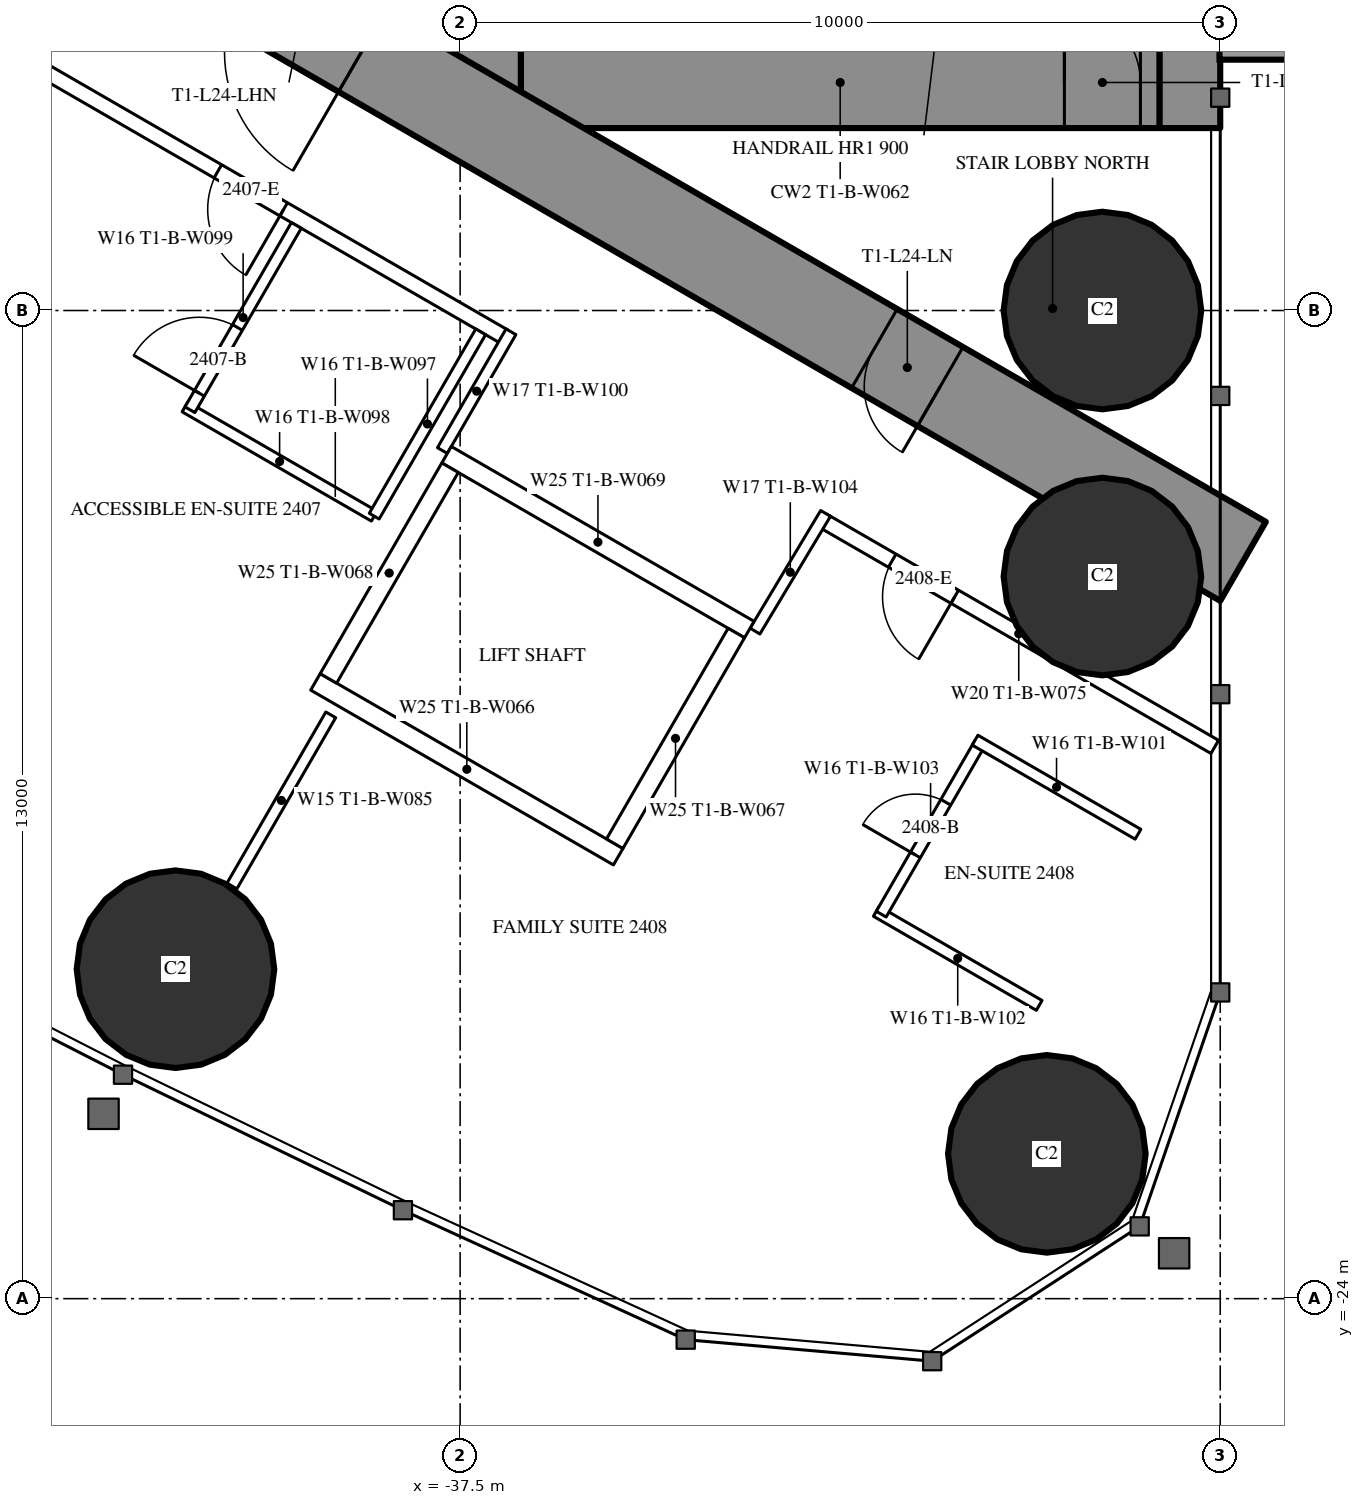
"""IFC4 building model, lengths in metres.
Left out: names, types, materials, properties, quantities, classifications, styles, units other than length and angle.
Written with IfcOpenShell. Run it as: python <this file> out.ifc"""

import sys

from ifc_helpers import new_model, si_unit, direction, frame, frame_2d, origin, origin_2d, place, context, subcontext, project, spatial, rectangle, hollow_circle, extrude, element, fill, save


model = new_model("IFC4")
c1 = context("Model", 3, precision=1e-05, world=origin(), true_north=direction((0.0, 1.0)))
c2 = subcontext(c1, "Body", "Model", "MODEL_VIEW")
j1 = project(units=[si_unit("LENGTHUNIT", "METRE"), si_unit("PLANEANGLEUNIT", "RADIAN")], contexts=[c1])
p1 = place(None, origin())
s1 = spatial("IfcSite", under=j1, at=p1, CompositionType="ELEMENT")
p2 = place(p1, origin())
s2 = spatial("IfcBuilding", under=s1, at=p2, CompositionType="ELEMENT")
p3 = place(p2, frame((0.0, 0.0, 94.1)))
s3 = spatial("IfcBuildingStorey", under=s2, at=p3, CompositionType="ELEMENT", Elevation=94.1)
for number, where, z_axis, x_axis in (
    (1, (-29.781, -22.095, 0.0), (0.0, 0.0, 1.0), (1.0, 0.0, 0.0)),
    (2, (-29.05, -11.0, 0.0), (0.0, 0.0, 1.0), (1.0, 0.0, 0.0)),
    (3, (-29.05, -14.5, 0.0), (0.0, 0.0, 1.0), (1.0, 0.0, 0.0)),
    (4, (-41.245, -19.666, 0.0), (0.0, 0.0, 1.0), (1.0, 0.0, 0.0)),
):
    element("IfcColumn", number, at=place(p3, frame(where, z_axis=z_axis, x_axis=x_axis)), inside=s3, PredefinedType="COLUMN", context=c2, shape_type="SweptSolid", body=[
        extrude(hollow_circle(Radius=1.3, WallThickness=0.1, at=origin_2d()), origin(), (0.0, 0.0, 1.0), 3.5),
    ])
p4 = place(p3, frame((-27.9, 8.6, 0.0), z_axis=(0.0, 0.0, 1.0), x_axis=(0.0, -1.0, 0.0)))
e5 = element("IfcWall", 5, at=p4, inside=s3, PredefinedType="SHEAR", context=c2, shape_type="SweptSolid", body=[
    extrude(rectangle(XDim=17.2, YDim=0.8, at=frame_2d((8.6, 0.0))), origin(), (0.0, 0.0, 1.0), 3.5),
])
p5 = place(p4, frame((2.45, 0.0, 0.6)))
e6 = element("IfcOpeningElement", 6, at=p5, cuts=e5, PredefinedType="OPENING", context=c2, shape_type="SweptSolid", body=[
    extrude(rectangle(XDim=0.6, YDim=2.1, at=frame_2d((0.3, 1.05))), frame((0.0, 0.41, 0.0), z_axis=(0.0, -1.0, 0.0), x_axis=(1.0, 0.0, 0.0)), (0.0, 0.0, 1.0), 0.82),
])
p6 = place(p4, frame((14.15, 0.0, 0.6)))
e7 = element("IfcOpeningElement", 7, at=p6, cuts=e5, PredefinedType="OPENING", context=c2, shape_type="SweptSolid", body=[
    extrude(rectangle(XDim=0.6, YDim=2.1, at=frame_2d((0.3, 1.05))), frame((0.0, 0.41, 0.0), z_axis=(0.0, -1.0, 0.0), x_axis=(1.0, 0.0, 0.0)), (0.0, 0.0, 1.0), 0.82),
])
p7 = place(p3, frame((-37.3, 8.6, 0.0), z_axis=(0.0, 0.0, 1.0), x_axis=(0.0, -1.0, 0.0)))
e8 = element("IfcWall", 8, at=p7, inside=s3, PredefinedType="SHEAR", context=c2, shape_type="SweptSolid", body=[
    extrude(rectangle(XDim=17.2, YDim=1.2, at=frame_2d((8.6, 0.0))), origin(), (0.0, 0.0, 1.0), 3.5),
])
p8 = place(p7, frame((7.7, 0.0, 0.0)))
e9 = element("IfcOpeningElement", 9, at=p8, cuts=e8, PredefinedType="OPENING", context=c2, shape_type="SweptSolid", body=[
    extrude(rectangle(XDim=1.8, YDim=2.2, at=frame_2d((0.9, 1.1))), frame((0.0, 0.61, 0.0), z_axis=(0.0, -1.0, 0.0), x_axis=(1.0, 0.0, 0.0)), (0.0, 0.0, 1.0), 1.22),
])
p9 = place(p3, frame((-28.3, -8.0, 0.0), z_axis=(0.0, 0.0, 1.0), x_axis=(-1.0, 0.0, 0.0)))
e10 = element("IfcWall", 10, at=p9, inside=s3, PredefinedType="SHEAR", context=c2, shape_type="SweptSolid", body=[
    extrude(rectangle(XDim=8.4, YDim=1.2, at=frame_2d((4.2, 0.0))), origin(), (0.0, 0.0, 1.0), 3.5),
])
p10 = place(p9, frame((0.25, 0.0, 0.0)))
e11 = element("IfcOpeningElement", 11, at=p10, cuts=e10, PredefinedType="OPENING", context=c2, shape_type="SweptSolid", body=[
    extrude(rectangle(XDim=1.0, YDim=2.2, at=frame_2d((0.5, 1.1))), frame((0.0, 0.61, 0.0), z_axis=(0.0, -1.0, 0.0), x_axis=(1.0, 0.0, 0.0)), (0.0, 0.0, 1.0), 1.22),
])
p11 = place(p3, frame((-27.2, -14.3, 0.0), z_axis=(0.0, 0.0, 1.0), x_axis=(-0.866024021859, 0.500002393557, 0.0)))
e12 = element("IfcWall", 12, at=p11, inside=s3, PredefinedType="SHEAR", context=c2, shape_type="SweptSolid", body=[
    extrude(rectangle(XDim=27.907, YDim=1.2, at=frame_2d((13.954, 0.0))), origin(), (0.0, 0.0, 1.0), 3.5),
])
p12 = place(p11, frame((4.6, 0.0, 0.0)))
e13 = element("IfcOpeningElement", 13, at=p12, cuts=e12, PredefinedType="OPENING", context=c2, shape_type="SweptSolid", body=[
    extrude(rectangle(XDim=1.0, YDim=2.2, at=frame_2d((0.5, 1.1))), frame((0.0, 0.61, 0.0), z_axis=(0.0, -1.0, 0.0), x_axis=(1.0, 0.0, 0.0)), (0.0, 0.0, 1.0), 1.22),
])
p13 = place(p11, frame((13.395, 0.0, 0.0)))
e14 = element("IfcOpeningElement", 14, at=p13, cuts=e12, PredefinedType="OPENING", context=c2, shape_type="SweptSolid", body=[
    extrude(rectangle(XDim=1.8, YDim=2.2, at=frame_2d((0.9, 1.1))), frame((0.0, 0.61, 0.0), z_axis=(0.0, -1.0, 0.0), x_axis=(1.0, 0.0, 0.0)), (0.0, 0.0, 1.0), 1.22),
])
p14 = place(p3, frame((-39.202, -16.32, 0.0), z_axis=(0.0, 0.0, 1.0), x_axis=(-0.49997716683, -0.86603858612, 0.0)))
e15 = element("IfcWall", 15, at=p14, inside=s3, PredefinedType="PARTITIONING", context=c2, shape_type="SweptSolid", body=[
    extrude(rectangle(XDim=2.6, YDim=0.15, at=frame_2d((1.3, 0.0))), origin(), (0.0, 0.0, 1.0), 3.25),
])
p15 = place(p3, frame((-27.572, -16.741, 0.0), z_axis=(0.0, 0.0, 1.0), x_axis=(-0.866024464444, 0.500001626982, 0.0)))
e16 = element("IfcWall", 16, at=p15, inside=s3, PredefinedType="PARTITIONING", context=c2, shape_type="SweptSolid", body=[
    extrude(rectangle(XDim=5.955, YDim=0.2, at=frame_2d((2.978, 0.0))), origin(), (0.0, 0.0, 1.0), 3.25),
])
p16 = place(p15, frame((3.95, 0.0, 0.0)))
e17 = element("IfcOpeningElement", 17, at=p16, cuts=e16, PredefinedType="OPENING", context=c2, shape_type="SweptSolid", body=[
    extrude(rectangle(XDim=0.95, YDim=2.2, at=frame_2d((0.475, 1.1))), frame((0.0, 0.11, 0.0), z_axis=(0.0, -1.0, 0.0), x_axis=(1.0, 0.0, 0.0)), (0.0, 0.0, 1.0), 0.22),
])
p17 = place(p3, frame((-36.92, -11.344, 0.0), z_axis=(0.0, 0.0, 1.0), x_axis=(-0.866028313256, 0.499994960614, 0.0)))
e18 = element("IfcWall", 18, at=p17, inside=s3, PredefinedType="PARTITIONING", context=c2, shape_type="SweptSolid", body=[
    extrude(rectangle(XDim=22.568, YDim=0.2, at=frame_2d((11.284, 0.0))), origin(), (0.0, 0.0, 1.0), 3.25),
])
p18 = place(p17, frame((14.481, 0.0, 0.0)))
e19 = element("IfcOpeningElement", 19, at=p18, cuts=e18, PredefinedType="OPENING", context=c2, shape_type="SweptSolid", body=[
    extrude(rectangle(XDim=0.95, YDim=2.2, at=frame_2d((0.475, 1.1))), frame((0.0, 0.11, 0.0), z_axis=(0.0, -1.0, 0.0), x_axis=(1.0, 0.0, 0.0)), (0.0, 0.0, 1.0), 0.22),
])
p19 = place(p17, frame((3.35, 0.0, 0.0)))
e20 = element("IfcOpeningElement", 20, at=p19, cuts=e18, PredefinedType="OPENING", context=c2, shape_type="SweptSolid", body=[
    extrude(rectangle(XDim=1.0, YDim=2.2, at=frame_2d((0.5, 1.1))), frame((0.0, 0.11, 0.0), z_axis=(0.0, -1.0, 0.0), x_axis=(1.0, 0.0, 0.0)), (0.0, 0.0, 1.0), 0.22),
])
p20 = place(p3, frame((-36.831, -11.28, 0.0), z_axis=(0.0, 0.0, 1.0), x_axis=(-0.499937177781, -0.866061671171, 0.0)))
e21 = element("IfcWall", 21, at=p20, inside=s3, PredefinedType="PARTITIONING", context=c2, shape_type="SweptSolid", body=[
    extrude(rectangle(XDim=1.804, YDim=0.15, at=frame_2d((0.902, 0.0))), origin(), (0.0, 0.0, 1.0), 3.25),
])
p21 = place(p3, frame((-33.621, -15.218, 0.0), z_axis=(0.0, 0.0, 1.0), x_axis=(0.514336634837, 0.857588377991, 0.0)))
e22 = element("IfcWall", 22, at=p21, inside=s3, PredefinedType="PARTITIONING", context=c2, shape_type="SweptSolid", body=[
    extrude(rectangle(XDim=1.805, YDim=0.15, at=frame_2d((0.903, 0.0))), origin(), (0.0, 0.0, 1.0), 3.25),
])
p22 = place(p3, frame((-38.63, -13.705, 0.0), z_axis=(0.0, 0.0, 1.0), x_axis=(-0.866018712932, 0.500011588718, 0.0)))
e23 = element("IfcWall", 23, at=p22, inside=s3, PredefinedType="PARTITIONING", context=c2, shape_type="SweptSolid", body=[
    extrude(rectangle(XDim=2.875, YDim=0.15, at=frame_2d((1.438, 0.0))), origin(), (0.0, 0.0, 1.0), 3.25),
])
p23 = place(p3, frame((-39.655, -9.88, 0.0), z_axis=(0.0, 0.0, 1.0), x_axis=(-0.500049511043, -0.865996816683, 0.0)))
e24 = element("IfcWall", 24, at=p23, inside=s3, PredefinedType="PARTITIONING", context=c2, shape_type="SweptSolid", body=[
    extrude(rectangle(XDim=2.8, YDim=0.15, at=frame_2d((1.4, 0.0))), origin(), (0.0, 0.0, 1.0), 3.25),
])
p24 = place(p23, frame((1.55, 0.0, 0.0)))
e25 = element("IfcOpeningElement", 25, at=p24, cuts=e24, PredefinedType="OPENING", context=c2, shape_type="SweptSolid", body=[
    extrude(rectangle(XDim=1.0, YDim=2.2, at=frame_2d((0.5, 1.1))), frame((0.0, 0.085, 0.0), z_axis=(0.0, -1.0, 0.0), x_axis=(1.0, 0.0, 0.0)), (0.0, 0.0, 1.0), 0.17),
])
p25 = place(p3, frame((-37.23, -11.281, 0.0), z_axis=(0.0, 0.0, 1.0), x_axis=(-0.500049511043, -0.865996816683, 0.0)))
e26 = element("IfcWall", 26, at=p25, inside=s3, PredefinedType="PARTITIONING", context=c2, shape_type="SweptSolid", body=[
    extrude(rectangle(XDim=2.8, YDim=0.15, at=frame_2d((1.4, 0.0))), origin(), (0.0, 0.0, 1.0), 3.25),
])
p26 = place(p3, frame((-29.882, -20.142, 0.0), z_axis=(0.0, 0.0, 1.0), x_axis=(-0.866031185235, 0.4999899861, 0.0)))
e27 = element("IfcWall", 27, at=p26, inside=s3, PredefinedType="PARTITIONING", context=c2, shape_type="SweptSolid", body=[
    extrude(rectangle(XDim=2.475, YDim=0.15, at=frame_2d((1.238, 0.0))), origin(), (0.0, 0.0, 1.0), 3.25),
])
p27 = place(p3, frame((-30.66, -16.69, 0.0), z_axis=(0.0, 0.0, 1.0), x_axis=(-0.499936506574, -0.866062058628, 0.0)))
e28 = element("IfcWall", 28, at=p27, inside=s3, PredefinedType="PARTITIONING", context=c2, shape_type="SweptSolid", body=[
    extrude(rectangle(XDim=2.6, YDim=0.15, at=frame_2d((1.3, 0.0))), origin(), (0.0, 0.0, 1.0), 3.25),
])
p28 = place(p27, frame((0.9, 0.0, 0.0)))
e29 = element("IfcOpeningElement", 29, at=p28, cuts=e28, PredefinedType="OPENING", context=c2, shape_type="SweptSolid", body=[
    extrude(rectangle(XDim=0.8, YDim=2.2, at=frame_2d((0.4, 1.1))), frame((0.0, 0.085, 0.0), z_axis=(0.0, -1.0, 0.0), x_axis=(1.0, 0.0, 0.0)), (0.0, 0.0, 1.0), 0.17),
])
p29 = place(p3, frame((-28.582, -17.89, 0.0), z_axis=(0.0, 0.0, 1.0), x_axis=(-0.866073894602, 0.499916002032, 0.0)))
e30 = element("IfcWall", 30, at=p29, inside=s3, PredefinedType="PARTITIONING", context=c2, shape_type="SweptSolid", body=[
    extrude(rectangle(XDim=2.475, YDim=0.15, at=frame_2d((1.238, 0.0))), origin(), (0.0, 0.0, 1.0), 3.25),
])
p30 = place(p3, frame((-33.696, -15.197, 0.0), z_axis=(0.0, 0.0, 1.0), x_axis=(-0.865976953817, 0.500083908417, 0.0)))
e31 = element("IfcWall", 31, at=p30, inside=s3, PredefinedType="PARTITIONING", context=c2, shape_type="SweptSolid", body=[
    extrude(rectangle(XDim=4.599, YDim=0.25, at=frame_2d((2.3, 0.0))), origin(), (0.0, 0.0, 1.0), 3.25),
])
p31 = place(p3, frame((-35.42, -18.186, 0.0), z_axis=(0.0, 0.0, 1.0), x_axis=(-0.865990227814, 0.50006092162, 0.0)))
e32 = element("IfcWall", 32, at=p31, inside=s3, PredefinedType="PARTITIONING", context=c2, shape_type="SweptSolid", body=[
    extrude(rectangle(XDim=4.6, YDim=0.25, at=frame_2d((2.3, 0.0))), origin(), (0.0, 0.0, 1.0), 3.25),
])
p32 = place(p3, frame((-33.866, -15.243, 0.0), z_axis=(0.0, 0.0, 1.0), x_axis=(-0.499929347863, -0.866066190972, 0.0)))
e33 = element("IfcWall", 33, at=p32, inside=s3, PredefinedType="PARTITIONING", context=c2, shape_type="SweptSolid", body=[
    extrude(rectangle(XDim=3.201, YDim=0.25, at=frame_2d((1.6, 0.0))), origin(), (0.0, 0.0, 1.0), 3.25),
])
p33 = place(p3, frame((-37.633, -13.068, 0.0), z_axis=(0.0, 0.0, 1.0), x_axis=(-0.499872130319, -0.866099216793, 0.0)))
e34 = element("IfcWall", 34, at=p33, inside=s3, PredefinedType="PARTITIONING", context=c2, shape_type="SweptSolid", body=[
    extrude(rectangle(XDim=3.2, YDim=0.25, at=frame_2d((1.6, 0.0))), origin(), (0.0, 0.0, 1.0), 3.25),
])
p34 = place(p24, origin())
e35 = element("IfcDoor", 35, at=p34, inside=s3, OperationType="SINGLE_SWING_RIGHT", PredefinedType="DOOR", context=c2, shape_type="SweptSolid", body=[
    extrude(rectangle(XDim=1.0, YDim=2.2, at=frame_2d((0.5, 1.1))), frame((0.0, 0.025, 0.0), z_axis=(0.0, -1.0, 0.0), x_axis=(1.0, 0.0, 0.0)), (0.0, 0.0, 1.0), 0.05),
])
fill(e25, e35)
p35 = place(p19, origin())
e36 = element("IfcDoor", 36, at=p35, inside=s3, OperationType="SINGLE_SWING_LEFT", PredefinedType="DOOR", context=c2, shape_type="SweptSolid", body=[
    extrude(rectangle(XDim=1.0, YDim=2.2, at=frame_2d((0.5, 1.1))), frame((0.0, 0.025, 0.0), z_axis=(0.0, -1.0, 0.0), x_axis=(1.0, 0.0, 0.0)), (0.0, 0.0, 1.0), 0.05),
])
fill(e20, e36)
p36 = place(p28, origin())
e37 = element("IfcDoor", 37, at=p36, inside=s3, OperationType="SINGLE_SWING_RIGHT", PredefinedType="DOOR", context=c2, shape_type="SweptSolid", body=[
    extrude(rectangle(XDim=0.8, YDim=2.2, at=frame_2d((0.4, 1.1))), frame((0.0, 0.025, 0.0), z_axis=(0.0, -1.0, 0.0), x_axis=(1.0, 0.0, 0.0)), (0.0, 0.0, 1.0), 0.05),
])
fill(e29, e37)
p37 = place(p16, origin())
e38 = element("IfcDoor", 38, at=p37, inside=s3, OperationType="SINGLE_SWING_LEFT", PredefinedType="DOOR", context=c2, shape_type="SweptSolid", body=[
    extrude(rectangle(XDim=0.95, YDim=2.2, at=frame_2d((0.475, 1.1))), frame((0.0, 0.025, 0.0), z_axis=(0.0, -1.0, 0.0), x_axis=(1.0, 0.0, 0.0)), (0.0, 0.0, 1.0), 0.05),
])
fill(e17, e38)
p38 = place(p12, origin())
e39 = element("IfcDoor", 39, at=p38, inside=s3, OperationType="SINGLE_SWING_LEFT", PredefinedType="DOOR", context=c2, shape_type="SweptSolid", body=[
    extrude(rectangle(XDim=1.0, YDim=2.2, at=frame_2d((0.5, 1.1))), frame((0.0, 0.025, 0.0), z_axis=(0.0, -1.0, 0.0), x_axis=(1.0, 0.0, 0.0)), (0.0, 0.0, 1.0), 0.05),
])
fill(e13, e39)
p39 = place(p13, origin())
e40 = element("IfcDoor", 40, at=p39, inside=s3, OperationType="DOUBLE_DOOR_SINGLE_SWING", PredefinedType="DOOR", context=c2, shape_type="SweptSolid", body=[
    extrude(rectangle(XDim=1.8, YDim=2.2, at=frame_2d((0.9, 1.1))), frame((0.0, 0.025, 0.0), z_axis=(0.0, -1.0, 0.0), x_axis=(1.0, 0.0, 0.0)), (0.0, 0.0, 1.0), 0.05),
])
fill(e14, e40)
p40 = place(p10, origin())
e41 = element("IfcDoor", 41, at=p40, inside=s3, OperationType="SINGLE_SWING_RIGHT", PredefinedType="DOOR", context=c2, shape_type="SweptSolid", body=[
    extrude(rectangle(XDim=1.0, YDim=2.2, at=frame_2d((0.5, 1.1))), frame((0.0, 0.025, 0.0), z_axis=(0.0, -1.0, 0.0), x_axis=(1.0, 0.0, 0.0)), (0.0, 0.0, 1.0), 0.05),
])
fill(e11, e41)
save(model, sys.argv[1])
